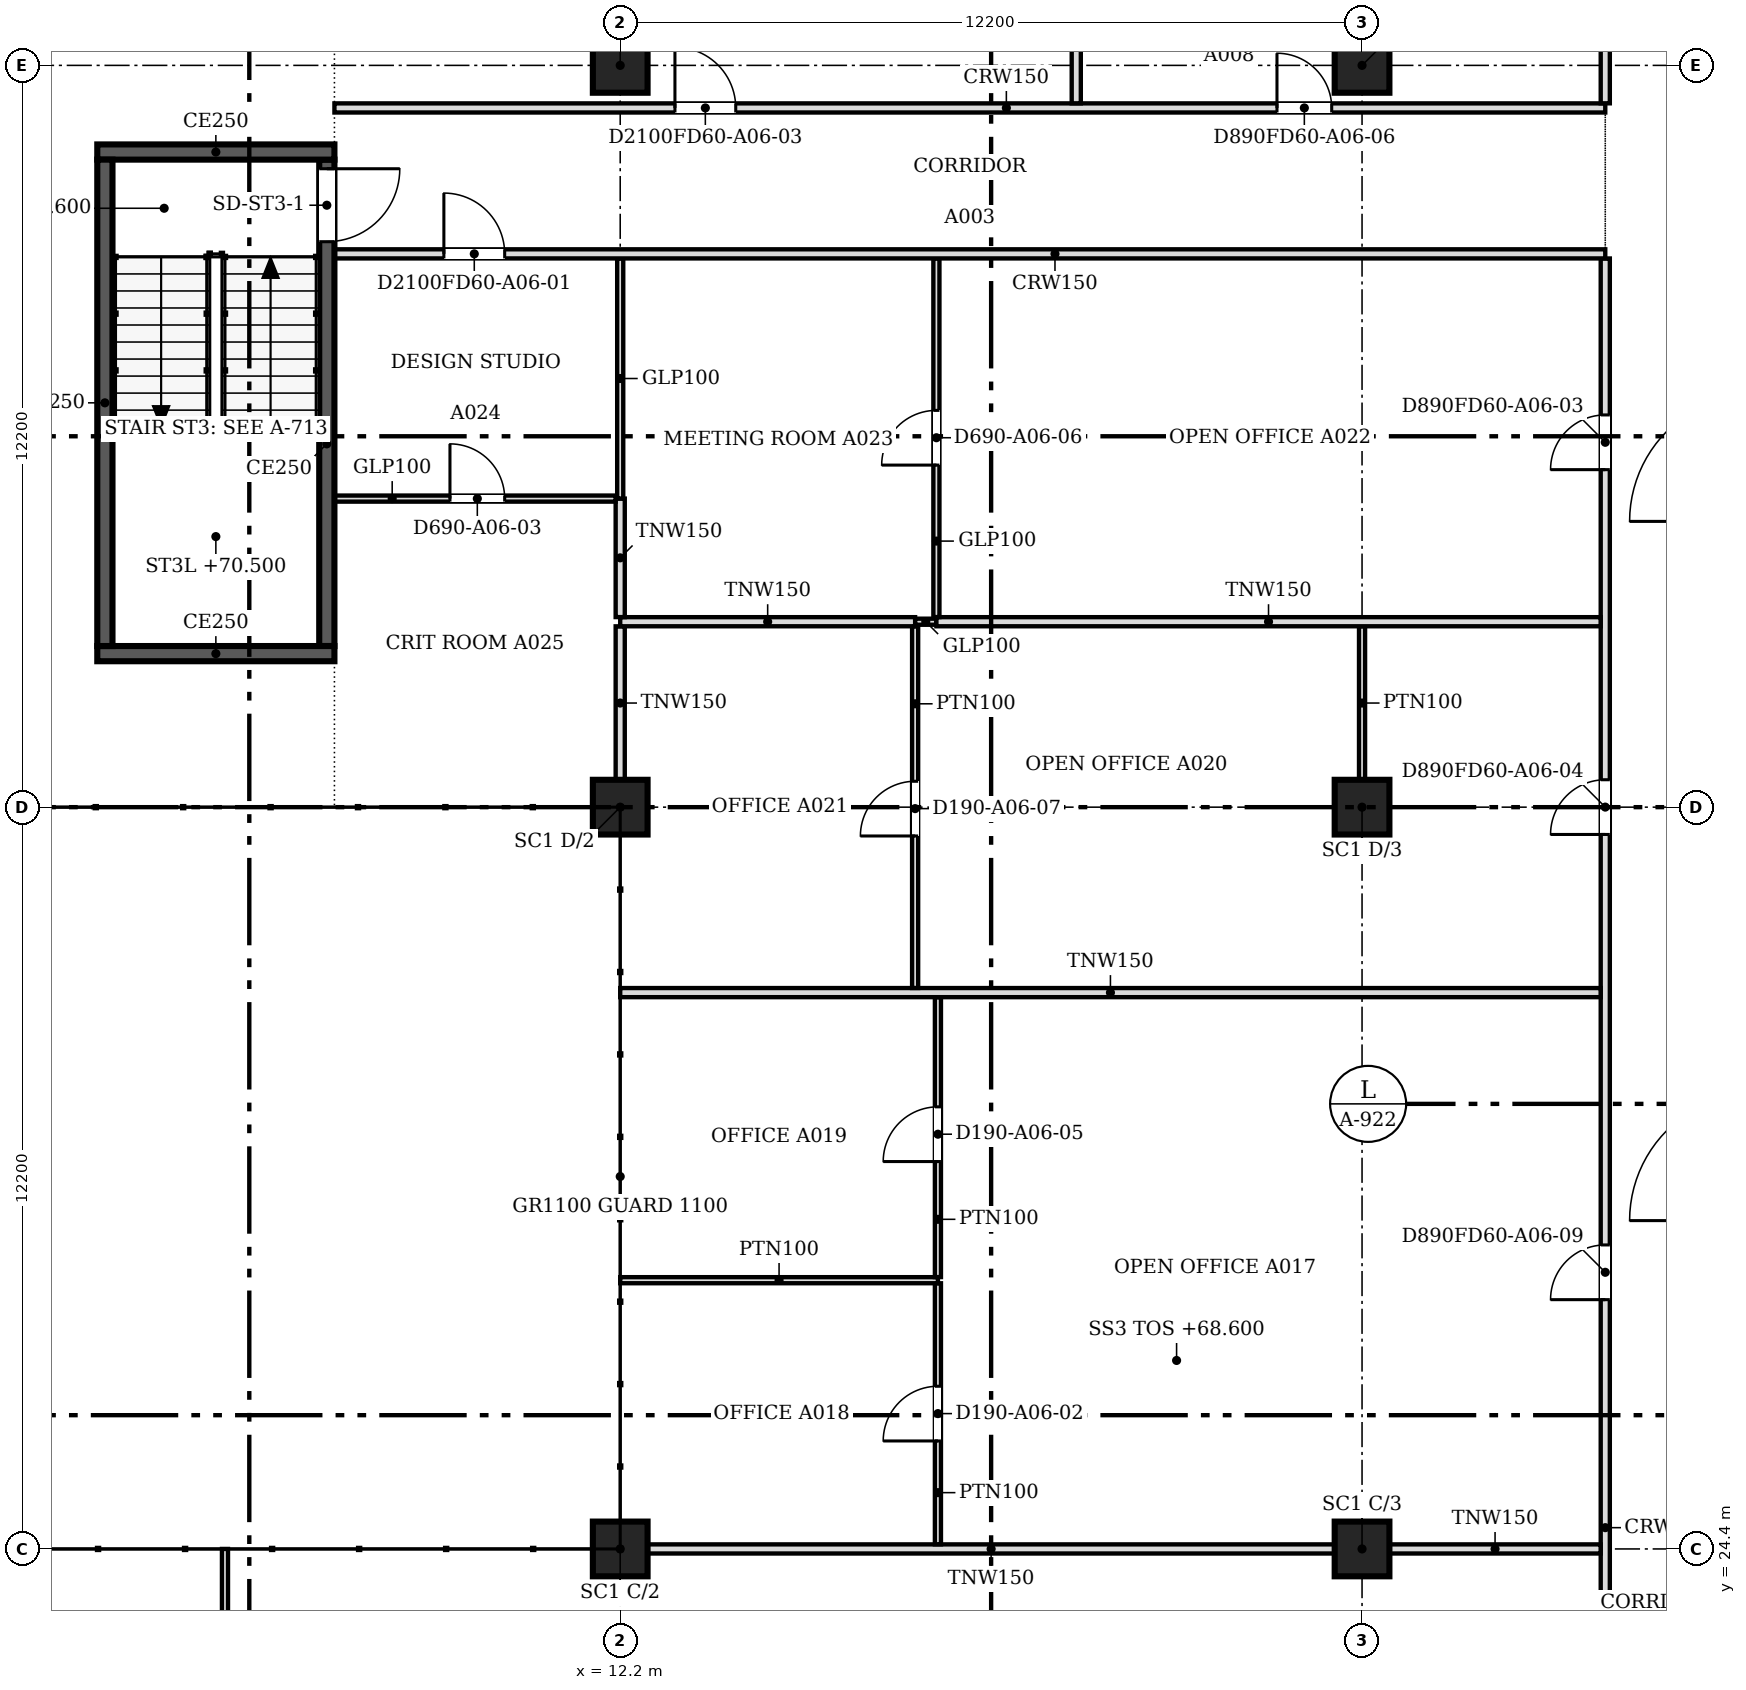
"""IFC4 building model, lengths in metres.
Left out: names, types, materials, properties, quantities, classifications, styles, units other than length and angle.
Written with IfcOpenShell. Run it as: python <this file> out.ifc"""

import sys

from ifc_helpers import new_model, si_unit, direction, frame, frame_2d, origin, origin_2d, place, context, subcontext, project, spatial, rectangle, extrude, source, transform, mapped, element, fill, save


model = new_model("IFC4")
c1 = context("Model", 3, precision=1e-05, world=origin(), true_north=direction((0.0, 1.0)))
c2 = subcontext(c1, "Body", "Model", "MODEL_VIEW")
j1 = project(units=[si_unit("LENGTHUNIT", "METRE"), si_unit("PLANEANGLEUNIT", "RADIAN")], contexts=[c1])
p1 = place(None, origin())
s1 = spatial("IfcSite", under=j1, at=p1, CompositionType="ELEMENT")
p2 = place(p1, origin())
s2 = spatial("IfcBuilding", under=s1, at=p2, CompositionType="ELEMENT")
p3 = place(p2, frame((0.0, 0.0, 68.6)))
s3 = spatial("IfcBuildingStorey", under=s2, at=p3, CompositionType="ELEMENT", Elevation=68.6)
for number, where, z_axis, x_axis in (
    (1, (12.2, 24.4, 0.0), (0.0, 0.0, 1.0), (1.0, 0.0, 0.0)),
    (2, (12.2, 36.6, 0.0), (0.0, 0.0, 1.0), (1.0, 0.0, 0.0)),
    (3, (12.2, 48.8, 0.0), (0.0, 0.0, 1.0), (1.0, 0.0, 0.0)),
    (4, (24.4, 24.4, 0.0), (0.0, 0.0, 1.0), (1.0, 0.0, 0.0)),
    (5, (24.4, 36.6, 0.0), (0.0, 0.0, 1.0), (1.0, 0.0, 0.0)),
    (6, (24.4, 48.8, 0.0), (0.0, 0.0, 1.0), (1.0, 0.0, 0.0)),
):
    element("IfcColumn", number, at=place(p3, frame(where, z_axis=z_axis, x_axis=x_axis)), inside=s3, PredefinedType="COLUMN", context=c2, shape_type="SweptSolid", body=[
        extrude(rectangle(XDim=0.9, YDim=0.9, at=origin_2d()), origin(), (0.0, 0.0, 1.0), 3.6),
    ])
p4 = place(p3, frame((7.5, 39.125, 0.0), z_axis=(0.0, 0.0, 1.0), x_axis=(-1.0, 0.0, 0.0)))
e7 = element("IfcWall", 7, at=p4, inside=s3, PredefinedType="SOLIDWALL", context=c2, shape_type="SweptSolid", body=[
    extrude(rectangle(XDim=3.9, YDim=0.25, at=frame_2d((1.95, 0.0))), origin(), (0.0, 0.0, 1.0), 3.8),
])
p5 = place(p3, frame((3.725, 39.25, 0.0), z_axis=(0.0, 0.0, 1.0), x_axis=(0.0, 1.0, 0.0)))
e8 = element("IfcWall", 8, at=p5, inside=s3, PredefinedType="SOLIDWALL", context=c2, shape_type="SweptSolid", body=[
    extrude(rectangle(XDim=8.0, YDim=0.25, at=frame_2d((4.0, 0.0))), origin(), (0.0, 0.0, 1.0), 3.8),
])
p6 = place(p3, frame((3.6, 47.375, 0.0), z_axis=(0.0, 0.0, 1.0), x_axis=(1.0, 0.0, 0.0)))
e9 = element("IfcWall", 9, at=p6, inside=s3, PredefinedType="SOLIDWALL", context=c2, shape_type="SweptSolid", body=[
    extrude(rectangle(XDim=3.9, YDim=0.25, at=frame_2d((1.95, 0.0))), origin(), (0.0, 0.0, 1.0), 3.8),
])
p7 = place(p3, frame((7.375, 47.25, 0.0), z_axis=(0.0, 0.0, 1.0), x_axis=(0.0, -1.0, 0.0)))
e10 = element("IfcWall", 10, at=p7, inside=s3, PredefinedType="SOLIDWALL", context=c2, shape_type="SweptSolid", body=[
    extrude(rectangle(XDim=8.0, YDim=0.25, at=frame_2d((4.0, 0.0))), origin(), (0.0, 0.0, 1.0), 3.8),
])
m1 = source(origin(), c2, "Body", "SweptSolid", [
    extrude(rectangle(XDim=1.2, YDim=2.1, at=frame_2d((0.6, 1.05))), frame((0.0, 0.135, 0.0), z_axis=(0.0, -1.0, 0.0), x_axis=(1.0, 0.0, 0.0)), (0.0, 0.0, 1.0), 0.27),
])
p8 = place(p7, frame((0.15, 0.0, 0.0)))
e11 = element("IfcOpeningElement", 11, at=p8, cuts=e10, PredefinedType="OPENING", context=c2, shape_type="MappedRepresentation", body=[
    mapped(m1, transform((0.0, 0.0, 0.0), scale=1.0)),
])
p9 = place(p3, frame((28.4, 18.8, 0.0), z_axis=(0.0, 0.0, 1.0), x_axis=(0.0, 1.0, 0.0)))
e12 = element("IfcWall", 12, at=p9, inside=s3, PredefinedType="PARTITIONING", context=c2, shape_type="SweptSolid", body=[
    extrude(rectangle(XDim=26.824, YDim=0.15, at=frame_2d((13.412, 0.0))), origin(), (0.0, 0.0, 1.0), 3.067),
])
m2 = source(origin(), c2, "Body", "SweptSolid", [
    extrude(rectangle(XDim=0.9, YDim=2.1, at=frame_2d((0.45, 1.05))), frame((0.0, 0.085, 0.0), z_axis=(0.0, -1.0, 0.0), x_axis=(1.0, 0.0, 0.0)), (0.0, 0.0, 1.0), 0.17),
])
p10 = place(p9, frame((1.3, 0.0, 0.0)))
e13 = element("IfcOpeningElement", 13, at=p10, cuts=e12, PredefinedType="OPENING", context=c2, shape_type="MappedRepresentation", body=[
    mapped(m2, transform((0.0, 0.0, 0.0), scale=1.0)),
])
p11 = place(p9, frame((23.351, 0.0, 0.0)))
e14 = element("IfcOpeningElement", 14, at=p11, cuts=e12, PredefinedType="OPENING", context=c2, shape_type="MappedRepresentation", body=[
    mapped(m2, transform((0.0, 0.0, 0.0), scale=1.0)),
])
p12 = place(p9, frame((17.351, 0.0, 0.0)))
e15 = element("IfcOpeningElement", 15, at=p12, cuts=e12, PredefinedType="OPENING", context=c2, shape_type="MappedRepresentation", body=[
    mapped(m2, transform((0.0, 0.0, 0.0), scale=1.0)),
])
p13 = place(p9, frame((9.7, 0.0, 0.0)))
e16 = element("IfcOpeningElement", 16, at=p13, cuts=e12, PredefinedType="OPENING", context=c2, shape_type="MappedRepresentation", body=[
    mapped(m2, transform((0.0, 0.0, 0.0), scale=1.0)),
])
p14 = place(p3, frame((5.7, 18.99, 0.0), z_axis=(0.0, 0.0, 1.0), x_axis=(0.0, 1.0, 0.0)))
e17 = element("IfcWall", 17, at=p14, inside=s3, PredefinedType="PARTITIONING", context=c2, shape_type="SweptSolid", body=[
    extrude(rectangle(XDim=5.41, YDim=0.1, at=frame_2d((2.705, 0.0))), origin(), (0.0, 0.0, 1.0), 3.067),
])
m3 = source(origin(), c2, "Body", "SweptSolid", [
    extrude(rectangle(XDim=0.9, YDim=2.1, at=frame_2d((0.45, 1.05))), frame((0.0, 0.06, 0.0), z_axis=(0.0, -1.0, 0.0), x_axis=(1.0, 0.0, 0.0)), (0.0, 0.0, 1.0), 0.12),
])
p15 = place(p14, frame((2.3, 0.0, 0.0)))
e18 = element("IfcOpeningElement", 18, at=p15, cuts=e17, PredefinedType="OPENING", context=c2, shape_type="MappedRepresentation", body=[
    mapped(m3, transform((0.0, 0.0, 0.0), scale=1.0)),
])
p16 = place(p3, frame((12.651, 24.4, 0.0), z_axis=(0.0, 0.0, 1.0), x_axis=(1.0, 0.0, 0.0)))
e19 = element("IfcWall", 19, at=p16, inside=s3, PredefinedType="PARTITIONING", context=c2, shape_type="SweptSolid", body=[
    extrude(rectangle(XDim=11.298, YDim=0.15, at=frame_2d((5.649, 0.0))), origin(), (0.0, 0.0, 1.0), 3.067),
])
p17 = place(p3, frame((24.851, 24.4, 0.0), z_axis=(0.0, 0.0, 1.0), x_axis=(1.0, 0.0, 0.0)))
e20 = element("IfcWall", 20, at=p17, inside=s3, PredefinedType="PARTITIONING", context=c2, shape_type="SweptSolid", body=[
    extrude(rectangle(XDim=3.473, YDim=0.15, at=frame_2d((1.736, 0.0))), origin(), (0.0, 0.0, 1.0), 3.067),
])
p18 = place(p3, frame((17.425, 24.476, 0.0), z_axis=(0.0, 0.0, 1.0), x_axis=(0.0, 1.0, 0.0)))
e21 = element("IfcWall", 21, at=p18, inside=s3, PredefinedType="PARTITIONING", context=c2, shape_type="SweptSolid", body=[
    extrude(rectangle(XDim=4.293, YDim=0.1, at=frame_2d((2.146, 0.0))), origin(), (0.0, 0.0, 1.0), 3.067),
])
p19 = place(p18, frame((1.7, 0.0, 0.0)))
e22 = element("IfcOpeningElement", 22, at=p19, cuts=e21, PredefinedType="OPENING", context=c2, shape_type="MappedRepresentation", body=[
    mapped(m3, transform((0.0, 0.0, 0.0), scale=1.0)),
])
p20 = place(p3, frame((12.2, 28.82, 0.0), z_axis=(0.0, 0.0, 1.0), x_axis=(1.0, 0.0, 0.0)))
e23 = element("IfcWall", 23, at=p20, inside=s3, PredefinedType="PARTITIONING", context=c2, shape_type="SweptSolid", body=[
    extrude(rectangle(XDim=5.225, YDim=0.1, at=frame_2d((2.613, 0.0))), origin(), (0.0, 0.0, 1.0), 3.067),
])
p21 = place(p3, frame((17.425, 28.871, 0.0), z_axis=(0.0, 0.0, 1.0), x_axis=(0.0, 1.0, 0.0)))
e24 = element("IfcWall", 24, at=p21, inside=s3, PredefinedType="PARTITIONING", context=c2, shape_type="SweptSolid", body=[
    extrude(rectangle(XDim=4.603, YDim=0.1, at=frame_2d((2.301, 0.0))), origin(), (0.0, 0.0, 1.0), 3.067),
])
p22 = place(p21, frame((1.9, 0.0, 0.0)))
e25 = element("IfcOpeningElement", 25, at=p22, cuts=e24, PredefinedType="OPENING", context=c2, shape_type="MappedRepresentation", body=[
    mapped(m3, transform((0.0, 0.0, 0.0), scale=1.0)),
])
p23 = place(p3, frame((12.2, 33.55, 0.0), z_axis=(0.0, 0.0, 1.0), x_axis=(1.0, 0.0, 0.0)))
e26 = element("IfcWall", 26, at=p23, inside=s3, PredefinedType="PARTITIONING", context=c2, shape_type="SweptSolid", body=[
    extrude(rectangle(XDim=16.124, YDim=0.15, at=frame_2d((8.062, 0.0))), origin(), (0.0, 0.0, 1.0), 3.067),
])
p24 = place(p3, frame((17.05, 33.626, 0.0), z_axis=(0.0, 0.0, 1.0), x_axis=(0.0, 1.0, 0.0)))
e27 = element("IfcWall", 27, at=p24, inside=s3, PredefinedType="PARTITIONING", context=c2, shape_type="SweptSolid", body=[
    extrude(rectangle(XDim=5.948, YDim=0.1, at=frame_2d((2.974, 0.0))), origin(), (0.0, 0.0, 1.0), 3.067),
])
p25 = place(p24, frame((2.5, 0.0, 0.0)))
e28 = element("IfcOpeningElement", 28, at=p25, cuts=e27, PredefinedType="OPENING", context=c2, shape_type="MappedRepresentation", body=[
    mapped(m3, transform((0.0, 0.0, 0.0), scale=1.0)),
])
p26 = place(p3, frame((12.2, 37.051, 0.0), z_axis=(0.0, 0.0, 1.0), x_axis=(0.0, 1.0, 0.0)))
e29 = element("IfcWall", 29, at=p26, inside=s3, PredefinedType="PARTITIONING", context=c2, shape_type="SweptSolid", body=[
    extrude(rectangle(XDim=2.523, YDim=0.15, at=frame_2d((1.261, 0.0))), origin(), (0.0, 0.0, 1.0), 3.067),
])
p27 = place(p3, frame((24.4, 37.05, 0.0), z_axis=(0.0, 0.0, 1.0), x_axis=(0.0, 1.0, 0.0)))
e30 = element("IfcWall", 30, at=p27, inside=s3, PredefinedType="PARTITIONING", context=c2, shape_type="SweptSolid", body=[
    extrude(rectangle(XDim=2.525, YDim=0.1, at=frame_2d((1.262, 0.0))), origin(), (0.0, 0.0, 1.0), 3.067),
])
p28 = place(p3, frame((12.2, 39.65, 0.0), z_axis=(0.0, 0.0, 1.0), x_axis=(1.0, 0.0, 0.0)))
e31 = element("IfcWall", 31, at=p28, inside=s3, PredefinedType="PARTITIONING", context=c2, shape_type="SweptSolid", body=[
    extrude(rectangle(XDim=4.85, YDim=0.15, at=frame_2d((2.425, 0.0))), origin(), (0.0, 0.0, 1.0), 3.067),
])
p29 = place(p3, frame((17.051, 39.65, 0.0), z_axis=(0.0, 0.0, 1.0), x_axis=(1.0, 0.0, 0.0)))
e32 = element("IfcWall", 32, at=p29, inside=s3, PredefinedType="PARTITIONING", context=c2, shape_type="SweptSolid", body=[
    extrude(rectangle(XDim=0.348, YDim=0.1, at=frame_2d((0.174, 0.0))), origin(), (0.0, 0.0, 1.0), 3.067),
])
p30 = place(p3, frame((17.4, 39.65, 0.0), z_axis=(0.0, 0.0, 1.0), x_axis=(1.0, 0.0, 0.0)))
e33 = element("IfcWall", 33, at=p30, inside=s3, PredefinedType="PARTITIONING", context=c2, shape_type="SweptSolid", body=[
    extrude(rectangle(XDim=10.924, YDim=0.15, at=frame_2d((5.462, 0.0))), origin(), (0.0, 0.0, 1.0), 3.067),
])
p31 = place(p3, frame((12.2, 39.726, 0.0), z_axis=(0.0, 0.0, 1.0), x_axis=(0.0, 1.0, 0.0)))
e34 = element("IfcWall", 34, at=p31, inside=s3, PredefinedType="PARTITIONING", context=c2, shape_type="SweptSolid", body=[
    extrude(rectangle(XDim=1.949, YDim=0.15, at=frame_2d((0.975, 0.0))), origin(), (0.0, 0.0, 1.0), 3.067),
])
p32 = place(p3, frame((17.4, 39.726, 0.0), z_axis=(0.0, 0.0, 1.0), x_axis=(0.0, 1.0, 0.0)))
e35 = element("IfcWall", 35, at=p32, inside=s3, PredefinedType="PARTITIONING", context=c2, shape_type="SweptSolid", body=[
    extrude(rectangle(XDim=5.898, YDim=0.1, at=frame_2d((2.949, 0.0))), origin(), (0.0, 0.0, 1.0), 3.067),
])
p33 = place(p32, frame((2.5, 0.0, 0.0)))
e36 = element("IfcOpeningElement", 36, at=p33, cuts=e35, PredefinedType="OPENING", context=c2, shape_type="MappedRepresentation", body=[
    mapped(m3, transform((0.0, 0.0, 0.0), scale=1.0)),
])
p34 = place(p3, frame((12.124, 41.675, 0.0), z_axis=(0.0, 0.0, 1.0), x_axis=(-1.0, 0.0, 0.0)))
e37 = element("IfcWall", 37, at=p34, inside=s3, PredefinedType="PARTITIONING", context=c2, shape_type="SweptSolid", body=[
    extrude(rectangle(XDim=4.624, YDim=0.1, at=frame_2d((2.312, 0.0))), origin(), (0.0, 0.0, 1.0), 3.067),
])
p35 = place(p34, frame((1.824, 0.0, 0.0)))
e38 = element("IfcOpeningElement", 38, at=p35, cuts=e37, PredefinedType="OPENING", context=c2, shape_type="MappedRepresentation", body=[
    mapped(m3, transform((0.0, 0.0, 0.0), scale=1.0)),
])
p36 = place(p3, frame((12.2, 41.676, 0.0), z_axis=(0.0, 0.0, 1.0), x_axis=(0.0, 1.0, 0.0)))
e39 = element("IfcWall", 39, at=p36, inside=s3, PredefinedType="PARTITIONING", context=c2, shape_type="SweptSolid", body=[
    extrude(rectangle(XDim=3.948, YDim=0.1, at=frame_2d((1.974, 0.0))), origin(), (0.0, 0.0, 1.0), 3.067),
])
p37 = place(p3, frame((28.4, 45.7, 0.0), z_axis=(0.0, 0.0, 1.0), x_axis=(-1.0, 0.0, 0.0)))
e40 = element("IfcWall", 40, at=p37, inside=s3, PredefinedType="PARTITIONING", context=c2, shape_type="SweptSolid", body=[
    extrude(rectangle(XDim=20.9, YDim=0.15, at=frame_2d((10.45, 0.0))), origin(), (0.0, 0.0, 1.0), 3.067),
])
m4 = source(origin(), c2, "Body", "SweptSolid", [
    extrude(rectangle(XDim=1.0, YDim=2.1, at=frame_2d((0.5, 1.05))), frame((0.0, 0.085, 0.0), z_axis=(0.0, -1.0, 0.0), x_axis=(1.0, 0.0, 0.0)), (0.0, 0.0, 1.0), 0.17),
])
p38 = place(p37, frame((18.1, 0.0, 0.0)))
e41 = element("IfcOpeningElement", 41, at=p38, cuts=e40, PredefinedType="OPENING", context=c2, shape_type="MappedRepresentation", body=[
    mapped(m4, transform((0.0, 0.0, 0.0), scale=1.0)),
])
p39 = place(p3, frame((7.5, 48.1, 0.0), z_axis=(0.0, 0.0, 1.0), x_axis=(1.0, 0.0, 0.0)))
e42 = element("IfcWall", 42, at=p39, inside=s3, PredefinedType="PARTITIONING", context=c2, shape_type="SweptSolid", body=[
    extrude(rectangle(XDim=20.9, YDim=0.15, at=frame_2d((10.45, 0.0))), origin(), (0.0, 0.0, 1.0), 3.067),
])
p40 = place(p39, frame((15.501, 0.0, 0.0)))
e43 = element("IfcOpeningElement", 43, at=p40, cuts=e42, PredefinedType="OPENING", context=c2, shape_type="MappedRepresentation", body=[
    mapped(m2, transform((0.0, 0.0, 0.0), scale=1.0)),
])
p41 = place(p39, frame((5.6, 0.0, 0.0)))
e44 = element("IfcOpeningElement", 44, at=p41, cuts=e42, PredefinedType="OPENING", context=c2, shape_type="MappedRepresentation", body=[
    mapped(m4, transform((0.0, 0.0, 0.0), scale=1.0)),
])
p42 = place(p3, frame((19.7, 48.176, 0.0), z_axis=(0.0, 0.0, 1.0), x_axis=(0.0, 1.0, 0.0)))
e45 = element("IfcWall", 45, at=p42, inside=s3, PredefinedType="PARTITIONING", context=c2, shape_type="SweptSolid", body=[
    extrude(rectangle(XDim=6.224, YDim=0.15, at=frame_2d((3.112, 0.0))), origin(), (0.0, 0.0, 1.0), 3.067),
])
p43 = place(p3, frame((28.4, 48.176, 0.0), z_axis=(0.0, 0.0, 1.0), x_axis=(0.0, 1.0, 0.0)))
e46 = element("IfcWall", 46, at=p43, inside=s3, PredefinedType="PARTITIONING", context=c2, shape_type="SweptSolid", body=[
    extrude(rectangle(XDim=2.648, YDim=0.15, at=frame_2d((1.324, 0.0))), origin(), (0.0, 0.0, 1.0), 3.067),
])
m5 = source(origin(), c2, "Body", "SweptSolid", [
    extrude(rectangle(XDim=1.2, YDim=2.1, at=frame_2d((0.6, 1.05))), frame((0.0, 0.025, 0.0), z_axis=(0.0, -1.0, 0.0), x_axis=(1.0, 0.0, 0.0)), (0.0, 0.0, 1.0), 0.05),
])
p44 = place(p8, origin())
e47 = element("IfcDoor", 47, at=p44, inside=s3, OperationType="SINGLE_SWING_LEFT", PredefinedType="DOOR", context=c2, shape_type="MappedRepresentation", body=[
    mapped(m5, transform((0.0, 0.0, 0.0), scale=1.0)),
])
fill(e11, e47)
m6 = source(origin(), c2, "Body", "SweptSolid", [
    extrude(rectangle(XDim=0.9, YDim=2.1, at=frame_2d((0.45, 1.05))), frame((0.0, 0.025, 0.0), z_axis=(0.0, -1.0, 0.0), x_axis=(1.0, 0.0, 0.0)), (0.0, 0.0, 1.0), 0.05),
])
p45 = place(p19, origin())
e48 = element("IfcDoor", 48, at=p45, inside=s3, OperationType="SINGLE_SWING_LEFT", PredefinedType="DOOR", context=c2, shape_type="MappedRepresentation", body=[
    mapped(m6, transform((0.0, 0.0, 0.0), scale=1.0)),
])
fill(e22, e48)
p46 = place(p22, origin())
e49 = element("IfcDoor", 49, at=p46, inside=s3, OperationType="SINGLE_SWING_LEFT", PredefinedType="DOOR", context=c2, shape_type="MappedRepresentation", body=[
    mapped(m6, transform((0.0, 0.0, 0.0), scale=1.0)),
])
fill(e25, e49)
p47 = place(p35, origin())
e50 = element("IfcDoor", 50, at=p47, inside=s3, OperationType="SINGLE_SWING_RIGHT", PredefinedType="DOOR", context=c2, shape_type="MappedRepresentation", body=[
    mapped(m6, transform((0.0, 0.0, 0.0), scale=1.0)),
])
fill(e38, e50)
m7 = source(origin(), c2, "Body", "SweptSolid", [
    extrude(rectangle(XDim=1.0, YDim=2.1, at=frame_2d((0.5, 1.05))), frame((0.0, 0.025, 0.0), z_axis=(0.0, -1.0, 0.0), x_axis=(1.0, 0.0, 0.0)), (0.0, 0.0, 1.0), 0.05),
])
p48 = place(p38, origin())
e51 = element("IfcDoor", 51, at=p48, inside=s3, OperationType="SINGLE_SWING_RIGHT", PredefinedType="DOOR", context=c2, shape_type="MappedRepresentation", body=[
    mapped(m7, transform((0.0, 0.0, 0.0), scale=1.0)),
])
fill(e41, e51)
p49 = place(p33, origin())
e52 = element("IfcDoor", 52, at=p49, inside=s3, OperationType="SINGLE_SWING_LEFT", PredefinedType="DOOR", context=c2, shape_type="MappedRepresentation", body=[
    mapped(m6, transform((0.0, 0.0, 0.0), scale=1.0)),
])
fill(e36, e52)
p50 = place(p25, origin())
e53 = element("IfcDoor", 53, at=p50, inside=s3, OperationType="SINGLE_SWING_LEFT", PredefinedType="DOOR", context=c2, shape_type="MappedRepresentation", body=[
    mapped(m6, transform((0.0, 0.0, 0.0), scale=1.0)),
])
fill(e28, e53)
p51 = place(p11, origin())
e54 = element("IfcDoor", 54, at=p51, inside=s3, OperationType="SINGLE_SWING_LEFT", PredefinedType="DOOR", context=c2, shape_type="MappedRepresentation", body=[
    mapped(m6, transform((0.0, 0.0, 0.0), scale=1.0)),
])
fill(e14, e54)
p52 = place(p12, origin())
e55 = element("IfcDoor", 55, at=p52, inside=s3, OperationType="SINGLE_SWING_LEFT", PredefinedType="DOOR", context=c2, shape_type="MappedRepresentation", body=[
    mapped(m6, transform((0.0, 0.0, 0.0), scale=1.0)),
])
fill(e15, e55)
p53 = place(p40, origin())
e56 = element("IfcDoor", 56, at=p53, inside=s3, OperationType="SINGLE_SWING_LEFT", PredefinedType="DOOR", context=c2, shape_type="MappedRepresentation", body=[
    mapped(m6, transform((0.0, 0.0, 0.0), scale=1.0)),
])
fill(e43, e56)
p54 = place(p13, origin())
e57 = element("IfcDoor", 57, at=p54, inside=s3, OperationType="SINGLE_SWING_LEFT", PredefinedType="DOOR", context=c2, shape_type="MappedRepresentation", body=[
    mapped(m6, transform((0.0, 0.0, 0.0), scale=1.0)),
])
fill(e16, e57)
p55 = place(p41, origin())
e58 = element("IfcDoor", 58, at=p55, inside=s3, OperationType="SINGLE_SWING_LEFT", PredefinedType="DOOR", context=c2, shape_type="MappedRepresentation", body=[
    mapped(m7, transform((0.0, 0.0, 0.0), scale=1.0)),
])
fill(e44, e58)
save(model, sys.argv[1])
